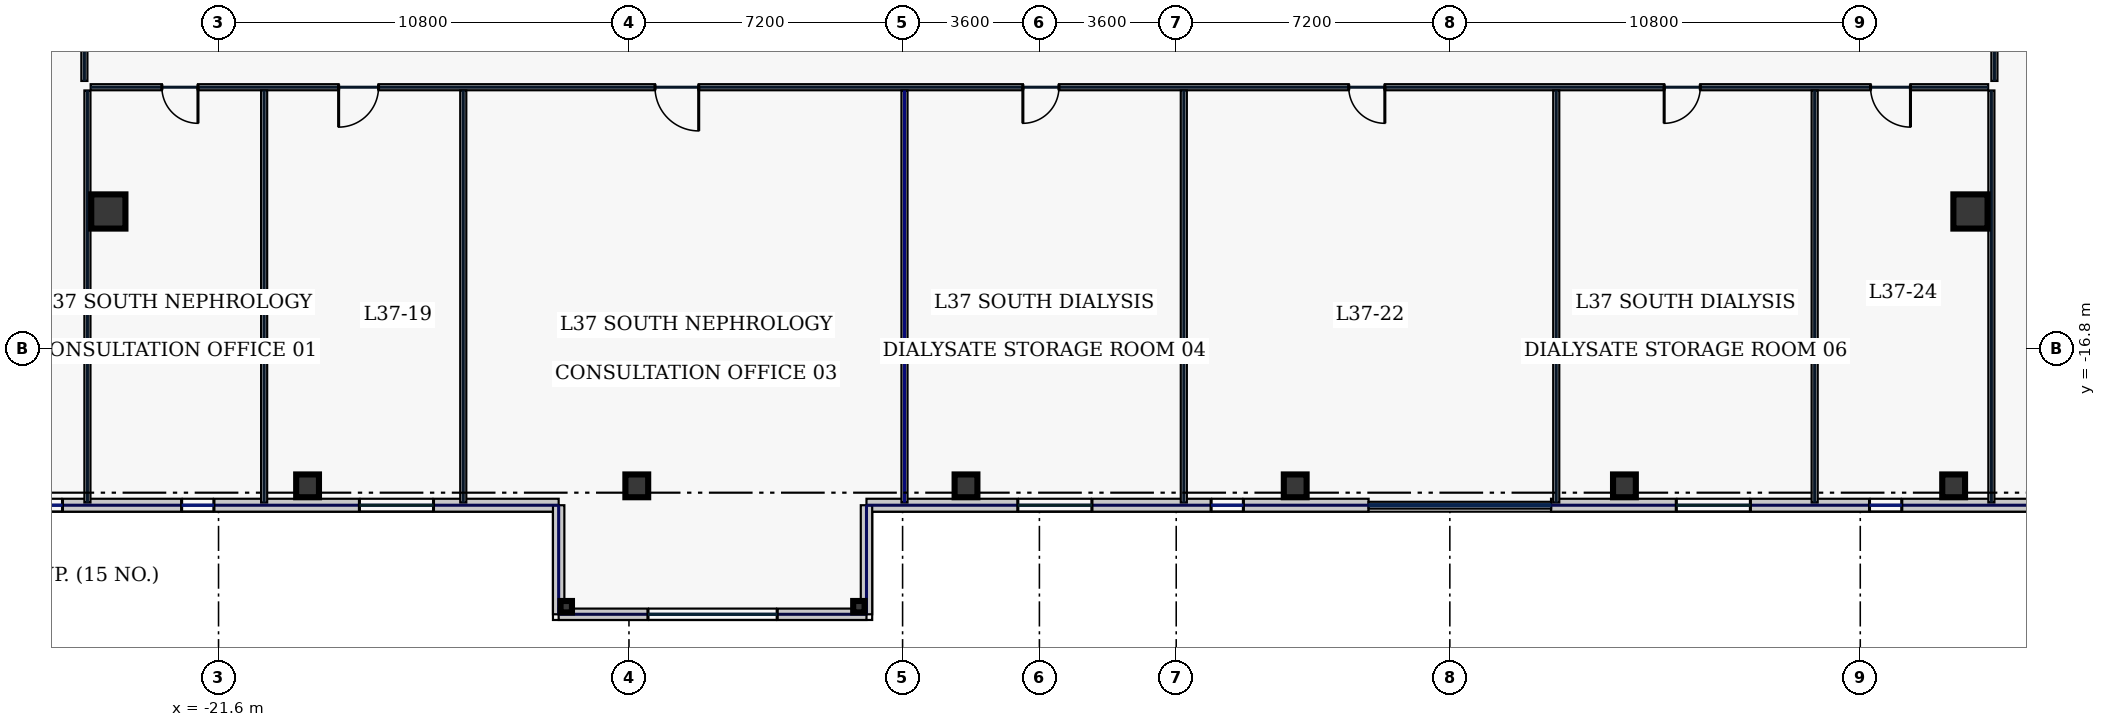
"""IFC4 building model, lengths in metres.
Left out: names, types, materials, properties, quantities, classifications, styles, units other than length and angle.
Written with IfcOpenShell. Run it as: python <this file> out.ifc"""

import sys

from ifc_helpers import new_model, si_unit, direction, frame, frame_2d, origin, origin_2d, place, context, subcontext, project, spatial, rectangle, hollow_rectangle, extrude, element, fill, save


model = new_model("IFC4")
c1 = context("Model", 3, precision=1e-05, world=origin(), true_north=direction((0.0, 1.0)))
c2 = subcontext(c1, "Body", "Model", "MODEL_VIEW")
j1 = project(units=[si_unit("LENGTHUNIT", "METRE"), si_unit("PLANEANGLEUNIT", "RADIAN")], contexts=[c1])
p1 = place(None, origin())
s1 = spatial("IfcSite", under=j1, at=p1, CompositionType="ELEMENT")
p2 = place(p1, origin())
s2 = spatial("IfcBuilding", under=s1, at=p2, CompositionType="ELEMENT")
p3 = place(p2, frame((0.0, 0.0, 164.2)))
s3 = spatial("IfcBuildingStorey", under=s2, at=p3, CompositionType="ELEMENT", Elevation=164.2)
for number, where, z_axis, x_axis in (
    (1, (-24.5, -13.2, 0.0), (0.0, 0.0, 1.0), (1.0, 0.0, 0.0)),
    (2, (24.5, -13.2, 0.0), (0.0, 0.0, 1.0), (1.0, 0.0, 0.0)),
):
    element("IfcColumn", number, at=place(p3, frame(where, z_axis=z_axis, x_axis=x_axis)), inside=s3, PredefinedType="COLUMN", context=c2, shape_type="SweptSolid", body=[
        extrude(hollow_rectangle(XDim=0.9, YDim=0.9, WallThickness=0.04, at=origin_2d()), origin(), (0.0, 0.0, 1.0), 3.74),
    ])
for number, where, z_axis, x_axis in (
    (3, (-19.257, -20.42, 0.0), (0.0, 0.0, 1.0), (1.0, 0.0, 0.0)),
    (4, (-10.594, -20.42, 0.0), (0.0, 0.0, 1.0), (1.0, 0.0, 0.0)),
    (5, (-1.931, -20.42, 0.0), (0.0, 0.0, 1.0), (1.0, 0.0, 0.0)),
    (6, (6.731, -20.42, 0.0), (0.0, 0.0, 1.0), (1.0, 0.0, 0.0)),
    (7, (15.394, -20.42, 0.0), (0.0, 0.0, 1.0), (1.0, 0.0, 0.0)),
    (8, (24.057, -20.42, 0.0), (0.0, 0.0, 1.0), (1.0, 0.0, 0.0)),
):
    element("IfcColumn", number, at=place(p3, frame(where, z_axis=z_axis, x_axis=x_axis)), inside=s3, PredefinedType="COLUMN", context=c2, shape_type="SweptSolid", body=[
        extrude(hollow_rectangle(XDim=0.6, YDim=0.6, WallThickness=0.028, at=origin_2d()), origin(), (0.0, 0.0, 1.0), 3.74),
    ])
for number, where, z_axis, x_axis in (
    (9, (-12.45, -23.6, 0.0), (0.0, 0.0, 1.0), (1.0, 0.0, 0.0)),
    (10, (-4.75, -23.6, 0.0), (0.0, 0.0, 1.0), (1.0, 0.0, 0.0)),
):
    element("IfcColumn", number, at=place(p3, frame(where, z_axis=z_axis, x_axis=x_axis)), inside=s3, PredefinedType="COLUMN", context=c2, shape_type="SweptSolid", body=[
        extrude(hollow_rectangle(XDim=0.3, YDim=0.3, WallThickness=0.016, at=origin_2d()), origin(), (0.0, 0.0, 1.0), 3.74),
    ])
p4 = place(p3, frame((-28.6, -20.93, 0.0), z_axis=(0.0, 0.0, 1.0), x_axis=(1.0, 0.0, 0.0)))
e11 = element("IfcWall", 11, at=p4, inside=s3, PredefinedType="STANDARD", context=c2, shape_type="SweptSolid", body=[
    extrude(rectangle(XDim=15.95, YDim=0.34, at=frame_2d((7.975, 0.0))), origin(), (0.0, 0.0, 1.0), 3.74),
])
p5 = place(p4, frame((2.044, 0.0, 0.8)))
e12 = element("IfcOpeningElement", 12, at=p5, cuts=e11, PredefinedType="OPENING", context=c2, shape_type="SweptSolid", body=[
    extrude(rectangle(XDim=0.85, YDim=1.85, at=frame_2d((0.425, 0.925))), frame((0.0, 0.18, 0.0), z_axis=(0.0, -1.0, 0.0), x_axis=(1.0, 0.0, 0.0)), (0.0, 0.0, 1.0), 0.36),
])
p6 = place(p4, frame((6.029, 0.0, 0.8)))
e13 = element("IfcOpeningElement", 13, at=p6, cuts=e11, PredefinedType="OPENING", context=c2, shape_type="SweptSolid", body=[
    extrude(rectangle(XDim=0.85, YDim=1.85, at=frame_2d((0.425, 0.925))), frame((0.0, 0.18, 0.0), z_axis=(0.0, -1.0, 0.0), x_axis=(1.0, 0.0, 0.0)), (0.0, 0.0, 1.0), 0.36),
])
p7 = place(p4, frame((10.707, 0.0, 0.8)))
e14 = element("IfcOpeningElement", 14, at=p7, cuts=e11, PredefinedType="OPENING", context=c2, shape_type="SweptSolid", body=[
    extrude(rectangle(XDim=1.95, YDim=2.1, at=frame_2d((0.975, 1.05))), frame((0.0, 0.18, 0.0), z_axis=(0.0, -1.0, 0.0), x_axis=(1.0, 0.0, 0.0)), (0.0, 0.0, 1.0), 0.36),
])
p8 = place(p3, frame((-4.55, -20.93, 0.0), z_axis=(0.0, 0.0, 1.0), x_axis=(1.0, 0.0, 0.0)))
e15 = element("IfcWall", 15, at=p8, inside=s3, PredefinedType="STANDARD", context=c2, shape_type="SweptSolid", body=[
    extrude(rectangle(XDim=13.213, YDim=0.34, at=frame_2d((6.606, 0.0))), origin(), (0.0, 0.0, 1.0), 3.74),
])
p9 = place(p8, frame((3.983, 0.0, 0.8)))
e16 = element("IfcOpeningElement", 16, at=p9, cuts=e15, PredefinedType="OPENING", context=c2, shape_type="SweptSolid", body=[
    extrude(rectangle(XDim=1.95, YDim=2.1, at=frame_2d((0.975, 1.05))), frame((0.0, 0.18, 0.0), z_axis=(0.0, -1.0, 0.0), x_axis=(1.0, 0.0, 0.0)), (0.0, 0.0, 1.0), 0.36),
])
p10 = place(p8, frame((9.067, 0.0, 0.8)))
e17 = element("IfcOpeningElement", 17, at=p10, cuts=e15, PredefinedType="OPENING", context=c2, shape_type="SweptSolid", body=[
    extrude(rectangle(XDim=0.85, YDim=1.85, at=frame_2d((0.425, 0.925))), frame((0.0, 0.18, 0.0), z_axis=(0.0, -1.0, 0.0), x_axis=(1.0, 0.0, 0.0)), (0.0, 0.0, 1.0), 0.36),
])
p11 = place(p3, frame((13.463, -20.93, 0.0), z_axis=(0.0, 0.0, 1.0), x_axis=(1.0, 0.0, 0.0)))
e18 = element("IfcWall", 18, at=p11, inside=s3, PredefinedType="STANDARD", context=c2, shape_type="SweptSolid", body=[
    extrude(rectangle(XDim=19.937, YDim=0.34, at=frame_2d((9.969, 0.0))), origin(), (0.0, 0.0, 1.0), 3.74),
])
p12 = place(p11, frame((3.295, 0.0, 0.8)))
e19 = element("IfcOpeningElement", 19, at=p12, cuts=e18, PredefinedType="OPENING", context=c2, shape_type="SweptSolid", body=[
    extrude(rectangle(XDim=1.95, YDim=2.1, at=frame_2d((0.975, 1.05))), frame((0.0, 0.18, 0.0), z_axis=(0.0, -1.0, 0.0), x_axis=(1.0, 0.0, 0.0)), (0.0, 0.0, 1.0), 0.36),
])
p13 = place(p11, frame((8.38, 0.0, 0.8)))
e20 = element("IfcOpeningElement", 20, at=p13, cuts=e18, PredefinedType="OPENING", context=c2, shape_type="SweptSolid", body=[
    extrude(rectangle(XDim=0.85, YDim=1.85, at=frame_2d((0.425, 0.925))), frame((0.0, 0.18, 0.0), z_axis=(0.0, -1.0, 0.0), x_axis=(1.0, 0.0, 0.0)), (0.0, 0.0, 1.0), 0.36),
])
p14 = place(p11, frame((13.058, 0.0, 0.8)))
e21 = element("IfcOpeningElement", 21, at=p14, cuts=e18, PredefinedType="OPENING", context=c2, shape_type="SweptSolid", body=[
    extrude(rectangle(XDim=0.85, YDim=1.85, at=frame_2d((0.425, 0.925))), frame((0.0, 0.18, 0.0), z_axis=(0.0, -1.0, 0.0), x_axis=(1.0, 0.0, 0.0)), (0.0, 0.0, 1.0), 0.36),
])
p15 = place(p11, frame((15.943, 0.0, 0.8)))
e22 = element("IfcOpeningElement", 22, at=p15, cuts=e18, PredefinedType="OPENING", context=c2, shape_type="SweptSolid", body=[
    extrude(rectangle(XDim=1.95, YDim=2.1, at=frame_2d((0.975, 1.05))), frame((0.0, 0.18, 0.0), z_axis=(0.0, -1.0, 0.0), x_axis=(1.0, 0.0, 0.0)), (0.0, 0.0, 1.0), 0.36),
])
for number, where, z_axis, x_axis in (
    (23, (-12.65, -20.93, 0.0), (0.0, 0.0, 1.0), (0.0, -1.0, 0.0)),
    (24, (-4.55, -20.93, 0.0), (0.0, 0.0, 1.0), (0.0, -1.0, 0.0)),
):
    element("IfcWall", number, at=place(p3, frame(where, z_axis=z_axis, x_axis=x_axis)), inside=s3, PredefinedType="STANDARD", context=c2, shape_type="SweptSolid", body=[
        extrude(rectangle(XDim=2.87, YDim=0.3, at=frame_2d((1.435, 0.0))), origin(), (0.0, 0.0, 1.0), 3.285),
    ])
p16 = place(p3, frame((-12.65, -23.8, 0.0), z_axis=(0.0, 0.0, 1.0), x_axis=(1.0, 0.0, 0.0)))
e25 = element("IfcWall", 25, at=p16, inside=s3, PredefinedType="STANDARD", context=c2, shape_type="SweptSolid", body=[
    extrude(rectangle(XDim=8.1, YDim=0.3, at=frame_2d((4.05, 0.0))), origin(), (0.0, 0.0, 1.0), 3.385),
])
p17 = place(p16, frame((2.35, 0.0, 0.68)))
e26 = element("IfcOpeningElement", 26, at=p17, cuts=e25, PredefinedType="OPENING", context=c2, shape_type="SweptSolid", body=[
    extrude(rectangle(XDim=3.4, YDim=2.35, at=frame_2d((1.7, 1.175))), frame((0.0, 0.16, 0.0), z_axis=(0.0, -1.0, 0.0), x_axis=(1.0, 0.0, 0.0)), (0.0, 0.0, 1.0), 0.32),
])
p18 = place(p3, frame((-25.13, -9.765, 0.0), z_axis=(0.0, 0.0, 1.0), x_axis=(0.0, 1.0, 0.0)))
e27 = element("IfcWall", 27, at=p18, inside=s3, PredefinedType="PARTITIONING", context=c2, shape_type="SweptSolid", body=[
    extrude(rectangle(XDim=2.98, YDim=0.16, at=frame_2d((1.49, 0.0))), origin(), (0.0, 0.0, 1.0), 3.74),
])
p19 = place(p18, frame((1.1, 0.0, 0.0)))
e28 = element("IfcOpeningElement", 28, at=p19, cuts=e27, PredefinedType="OPENING", context=c2, shape_type="SweptSolid", body=[
    extrude(rectangle(XDim=0.95, YDim=2.2, at=frame_2d((0.475, 1.1))), frame((0.0, 0.09, 0.0), z_axis=(0.0, -1.0, 0.0), x_axis=(1.0, 0.0, 0.0)), (0.0, 0.0, 1.0), 0.18),
])
p20 = place(p3, frame((25.13, -6.785, 0.0), z_axis=(0.0, 0.0, 1.0), x_axis=(0.0, -1.0, 0.0)))
e29 = element("IfcWall", 29, at=p20, inside=s3, PredefinedType="PARTITIONING", context=c2, shape_type="SweptSolid", body=[
    extrude(rectangle(XDim=2.98, YDim=0.16, at=frame_2d((1.49, 0.0))), origin(), (0.0, 0.0, 1.0), 3.74),
])
p21 = place(p20, frame((1.1, 0.0, 0.0)))
e30 = element("IfcOpeningElement", 30, at=p21, cuts=e29, PredefinedType="OPENING", context=c2, shape_type="SweptSolid", body=[
    extrude(rectangle(XDim=0.95, YDim=2.2, at=frame_2d((0.475, 1.1))), frame((0.0, 0.09, 0.0), z_axis=(0.0, -1.0, 0.0), x_axis=(1.0, 0.0, 0.0)), (0.0, 0.0, 1.0), 0.18),
])
p22 = place(p3, frame((24.965, -9.93, 0.0), z_axis=(0.0, 0.0, 1.0), x_axis=(-1.0, 0.0, 0.0)))
e31 = element("IfcWall", 31, at=p22, inside=s3, PredefinedType="PARTITIONING", context=c2, shape_type="SweptSolid", body=[
    extrude(rectangle(XDim=49.93, YDim=0.16, at=frame_2d((24.965, 0.0))), origin(), (0.0, 0.0, 1.0), 3.74),
])
p23 = place(p22, frame((47.106, 0.0, 0.0)))
e32 = element("IfcOpeningElement", 32, at=p23, cuts=e31, PredefinedType="OPENING", context=c2, shape_type="SweptSolid", body=[
    extrude(rectangle(XDim=0.95, YDim=2.2, at=frame_2d((0.475, 1.1))), frame((0.0, 0.09, 0.0), z_axis=(0.0, -1.0, 0.0), x_axis=(1.0, 0.0, 0.0)), (0.0, 0.0, 1.0), 0.18),
])
p24 = place(p22, frame((42.355, 0.0, 0.0)))
e33 = element("IfcOpeningElement", 33, at=p24, cuts=e31, PredefinedType="OPENING", context=c2, shape_type="SweptSolid", body=[
    extrude(rectangle(XDim=1.05, YDim=2.2, at=frame_2d((0.525, 1.1))), frame((0.0, 0.09, 0.0), z_axis=(0.0, -1.0, 0.0), x_axis=(1.0, 0.0, 0.0)), (0.0, 0.0, 1.0), 0.18),
])
p25 = place(p22, frame((33.93, 0.0, 0.0)))
e34 = element("IfcOpeningElement", 34, at=p25, cuts=e31, PredefinedType="OPENING", context=c2, shape_type="SweptSolid", body=[
    extrude(rectangle(XDim=1.15, YDim=2.2, at=frame_2d((0.575, 1.1))), frame((0.0, 0.09, 0.0), z_axis=(0.0, -1.0, 0.0), x_axis=(1.0, 0.0, 0.0)), (0.0, 0.0, 1.0), 0.18),
])
p26 = place(p22, frame((24.45, 0.0, 0.0)))
e35 = element("IfcOpeningElement", 35, at=p26, cuts=e31, PredefinedType="OPENING", context=c2, shape_type="SweptSolid", body=[
    extrude(rectangle(XDim=0.95, YDim=2.2, at=frame_2d((0.475, 1.1))), frame((0.0, 0.09, 0.0), z_axis=(0.0, -1.0, 0.0), x_axis=(1.0, 0.0, 0.0)), (0.0, 0.0, 1.0), 0.18),
])
p27 = place(p22, frame((15.875, 0.0, 0.0)))
e36 = element("IfcOpeningElement", 36, at=p27, cuts=e31, PredefinedType="OPENING", context=c2, shape_type="SweptSolid", body=[
    extrude(rectangle(XDim=0.95, YDim=2.2, at=frame_2d((0.475, 1.1))), frame((0.0, 0.09, 0.0), z_axis=(0.0, -1.0, 0.0), x_axis=(1.0, 0.0, 0.0)), (0.0, 0.0, 1.0), 0.18),
])
p28 = place(p22, frame((7.575, 0.0, 0.0)))
e37 = element("IfcOpeningElement", 37, at=p28, cuts=e31, PredefinedType="OPENING", context=c2, shape_type="SweptSolid", body=[
    extrude(rectangle(XDim=0.95, YDim=2.2, at=frame_2d((0.475, 1.1))), frame((0.0, 0.09, 0.0), z_axis=(0.0, -1.0, 0.0), x_axis=(1.0, 0.0, 0.0)), (0.0, 0.0, 1.0), 0.18),
])
p29 = place(p22, frame((2.044, 0.0, 0.0)))
e38 = element("IfcOpeningElement", 38, at=p29, cuts=e31, PredefinedType="OPENING", context=c2, shape_type="SweptSolid", body=[
    extrude(rectangle(XDim=1.05, YDim=2.2, at=frame_2d((0.525, 1.1))), frame((0.0, 0.09, 0.0), z_axis=(0.0, -1.0, 0.0), x_axis=(1.0, 0.0, 0.0)), (0.0, 0.0, 1.0), 0.18),
])
for number, where, z_axis, x_axis in (
    (39, (-25.05, -20.86, 0.0), (0.0, 0.0, 1.0), (0.0, 1.0, 0.0)),
    (40, (25.05, -20.86, 0.0), (0.0, 0.0, 1.0), (0.0, 1.0, 0.0)),
    (41, (-20.4, -20.86, 0.0), (0.0, 0.0, 1.0), (0.0, 1.0, 0.0)),
    (42, (-15.16, -20.86, 0.0), (0.0, 0.0, 1.0), (0.0, 1.0, 0.0)),
):
    element("IfcWall", number, at=place(p3, frame(where, z_axis=z_axis, x_axis=x_axis)), inside=s3, PredefinedType="PARTITIONING", context=c2, shape_type="SweptSolid", body=[
        extrude(rectangle(XDim=10.845, YDim=0.16, at=frame_2d((5.423, 0.0))), origin(), (0.0, 0.0, 1.0), 3.74),
    ])
p30 = place(p3, frame((-3.55, -20.86, 0.0), z_axis=(0.0, 0.0, 1.0), x_axis=(0.0, 1.0, 0.0)))
e43 = element("IfcWall", 43, at=p30, inside=s3, PredefinedType="PARTITIONING", context=c2, shape_type="SweptSolid", body=[
    extrude(rectangle(XDim=10.845, YDim=0.16, at=frame_2d((5.423, 0.0))), origin(), (0.0, 0.0, 1.0), 3.285),
])
for number, where, z_axis, x_axis in (
    (44, (3.8, -20.86, 0.0), (0.0, 0.0, 1.0), (0.0, 1.0, 0.0)),
    (45, (13.6, -20.86, 0.0), (0.0, 0.0, 1.0), (0.0, 1.0, 0.0)),
    (46, (20.4, -20.86, 0.0), (0.0, 0.0, 1.0), (0.0, 1.0, 0.0)),
):
    element("IfcWall", number, at=place(p3, frame(where, z_axis=z_axis, x_axis=x_axis)), inside=s3, PredefinedType="PARTITIONING", context=c2, shape_type="SweptSolid", body=[
        extrude(rectangle(XDim=10.845, YDim=0.16, at=frame_2d((5.423, 0.0))), origin(), (0.0, 0.0, 1.0), 3.74),
    ])
p31 = place(p5, origin())
e47 = element("IfcWindow", 47, at=p31, inside=s3, PartitioningType="SINGLE_PANEL", PredefinedType="WINDOW", context=c2, shape_type="SweptSolid", body=[
    extrude(rectangle(XDim=0.85, YDim=1.85, at=frame_2d((0.425, 0.925))), frame((0.0, 0.03, 0.0), z_axis=(0.0, -1.0, 0.0), x_axis=(1.0, 0.0, 0.0)), (0.0, 0.0, 1.0), 0.06),
])
fill(e12, e47)
p32 = place(p6, origin())
e48 = element("IfcWindow", 48, at=p32, inside=s3, PartitioningType="SINGLE_PANEL", PredefinedType="WINDOW", context=c2, shape_type="SweptSolid", body=[
    extrude(rectangle(XDim=0.85, YDim=1.85, at=frame_2d((0.425, 0.925))), frame((0.0, 0.03, 0.0), z_axis=(0.0, -1.0, 0.0), x_axis=(1.0, 0.0, 0.0)), (0.0, 0.0, 1.0), 0.06),
])
fill(e13, e48)
p33 = place(p7, origin())
e49 = element("IfcWindow", 49, at=p33, inside=s3, PartitioningType="SINGLE_PANEL", PredefinedType="WINDOW", context=c2, shape_type="SweptSolid", body=[
    extrude(rectangle(XDim=1.95, YDim=2.1, at=frame_2d((0.975, 1.05))), frame((0.0, 0.03, 0.0), z_axis=(0.0, -1.0, 0.0), x_axis=(1.0, 0.0, 0.0)), (0.0, 0.0, 1.0), 0.06),
])
fill(e14, e49)
p34 = place(p9, origin())
e50 = element("IfcWindow", 50, at=p34, inside=s3, PartitioningType="SINGLE_PANEL", PredefinedType="WINDOW", context=c2, shape_type="SweptSolid", body=[
    extrude(rectangle(XDim=1.95, YDim=2.1, at=frame_2d((0.975, 1.05))), frame((0.0, 0.03, 0.0), z_axis=(0.0, -1.0, 0.0), x_axis=(1.0, 0.0, 0.0)), (0.0, 0.0, 1.0), 0.06),
])
fill(e16, e50)
p35 = place(p10, origin())
e51 = element("IfcWindow", 51, at=p35, inside=s3, PartitioningType="SINGLE_PANEL", PredefinedType="WINDOW", context=c2, shape_type="SweptSolid", body=[
    extrude(rectangle(XDim=0.85, YDim=1.85, at=frame_2d((0.425, 0.925))), frame((0.0, 0.03, 0.0), z_axis=(0.0, -1.0, 0.0), x_axis=(1.0, 0.0, 0.0)), (0.0, 0.0, 1.0), 0.06),
])
fill(e17, e51)
p36 = place(p12, origin())
e52 = element("IfcWindow", 52, at=p36, inside=s3, PartitioningType="SINGLE_PANEL", PredefinedType="WINDOW", context=c2, shape_type="SweptSolid", body=[
    extrude(rectangle(XDim=1.95, YDim=2.1, at=frame_2d((0.975, 1.05))), frame((0.0, 0.03, 0.0), z_axis=(0.0, -1.0, 0.0), x_axis=(1.0, 0.0, 0.0)), (0.0, 0.0, 1.0), 0.06),
])
fill(e19, e52)
p37 = place(p13, origin())
e53 = element("IfcWindow", 53, at=p37, inside=s3, PartitioningType="SINGLE_PANEL", PredefinedType="WINDOW", context=c2, shape_type="SweptSolid", body=[
    extrude(rectangle(XDim=0.85, YDim=1.85, at=frame_2d((0.425, 0.925))), frame((0.0, 0.03, 0.0), z_axis=(0.0, -1.0, 0.0), x_axis=(1.0, 0.0, 0.0)), (0.0, 0.0, 1.0), 0.06),
])
fill(e20, e53)
p38 = place(p17, origin())
e54 = element("IfcWindow", 54, at=p38, inside=s3, PartitioningType="SINGLE_PANEL", PredefinedType="WINDOW", context=c2, shape_type="SweptSolid", body=[
    extrude(rectangle(XDim=3.4, YDim=2.35, at=frame_2d((1.7, 1.175))), frame((0.0, 0.03, 0.0), z_axis=(0.0, -1.0, 0.0), x_axis=(1.0, 0.0, 0.0)), (0.0, 0.0, 1.0), 0.06),
])
fill(e26, e54)
p39 = place(p23, origin())
e55 = element("IfcDoor", 55, at=p39, inside=s3, OperationType="SINGLE_SWING_LEFT", PredefinedType="DOOR", context=c2, shape_type="SweptSolid", body=[
    extrude(rectangle(XDim=0.95, YDim=2.2, at=frame_2d((0.475, 1.1))), frame((0.0, 0.025, 0.0), z_axis=(0.0, -1.0, 0.0), x_axis=(1.0, 0.0, 0.0)), (0.0, 0.0, 1.0), 0.05),
])
fill(e32, e55)
p40 = place(p24, origin())
e56 = element("IfcDoor", 56, at=p40, inside=s3, OperationType="SINGLE_SWING_RIGHT", PredefinedType="DOOR", context=c2, shape_type="SweptSolid", body=[
    extrude(rectangle(XDim=1.05, YDim=2.2, at=frame_2d((0.525, 1.1))), frame((0.0, 0.025, 0.0), z_axis=(0.0, -1.0, 0.0), x_axis=(1.0, 0.0, 0.0)), (0.0, 0.0, 1.0), 0.05),
])
fill(e33, e56)
p41 = place(p25, origin())
e57 = element("IfcDoor", 57, at=p41, inside=s3, OperationType="SINGLE_SWING_LEFT", PredefinedType="DOOR", context=c2, shape_type="SweptSolid", body=[
    extrude(rectangle(XDim=1.15, YDim=2.2, at=frame_2d((0.575, 1.1))), frame((0.0, 0.025, 0.0), z_axis=(0.0, -1.0, 0.0), x_axis=(1.0, 0.0, 0.0)), (0.0, 0.0, 1.0), 0.05),
])
fill(e34, e57)
p42 = place(p26, origin())
e58 = element("IfcDoor", 58, at=p42, inside=s3, OperationType="SINGLE_SWING_RIGHT", PredefinedType="DOOR", context=c2, shape_type="SweptSolid", body=[
    extrude(rectangle(XDim=0.95, YDim=2.2, at=frame_2d((0.475, 1.1))), frame((0.0, 0.025, 0.0), z_axis=(0.0, -1.0, 0.0), x_axis=(1.0, 0.0, 0.0)), (0.0, 0.0, 1.0), 0.05),
])
fill(e35, e58)
p43 = place(p27, origin())
e59 = element("IfcDoor", 59, at=p43, inside=s3, OperationType="SINGLE_SWING_LEFT", PredefinedType="DOOR", context=c2, shape_type="SweptSolid", body=[
    extrude(rectangle(XDim=0.95, YDim=2.2, at=frame_2d((0.475, 1.1))), frame((0.0, 0.025, 0.0), z_axis=(0.0, -1.0, 0.0), x_axis=(1.0, 0.0, 0.0)), (0.0, 0.0, 1.0), 0.05),
])
fill(e36, e59)
p44 = place(p28, origin())
e60 = element("IfcDoor", 60, at=p44, inside=s3, OperationType="SINGLE_SWING_RIGHT", PredefinedType="DOOR", context=c2, shape_type="SweptSolid", body=[
    extrude(rectangle(XDim=0.95, YDim=2.2, at=frame_2d((0.475, 1.1))), frame((0.0, 0.025, 0.0), z_axis=(0.0, -1.0, 0.0), x_axis=(1.0, 0.0, 0.0)), (0.0, 0.0, 1.0), 0.05),
])
fill(e37, e60)
p45 = place(p29, origin())
e61 = element("IfcDoor", 61, at=p45, inside=s3, OperationType="SINGLE_SWING_LEFT", PredefinedType="DOOR", context=c2, shape_type="SweptSolid", body=[
    extrude(rectangle(XDim=1.05, YDim=2.2, at=frame_2d((0.525, 1.1))), frame((0.0, 0.025, 0.0), z_axis=(0.0, -1.0, 0.0), x_axis=(1.0, 0.0, 0.0)), (0.0, 0.0, 1.0), 0.05),
])
fill(e38, e61)
save(model, sys.argv[1])
